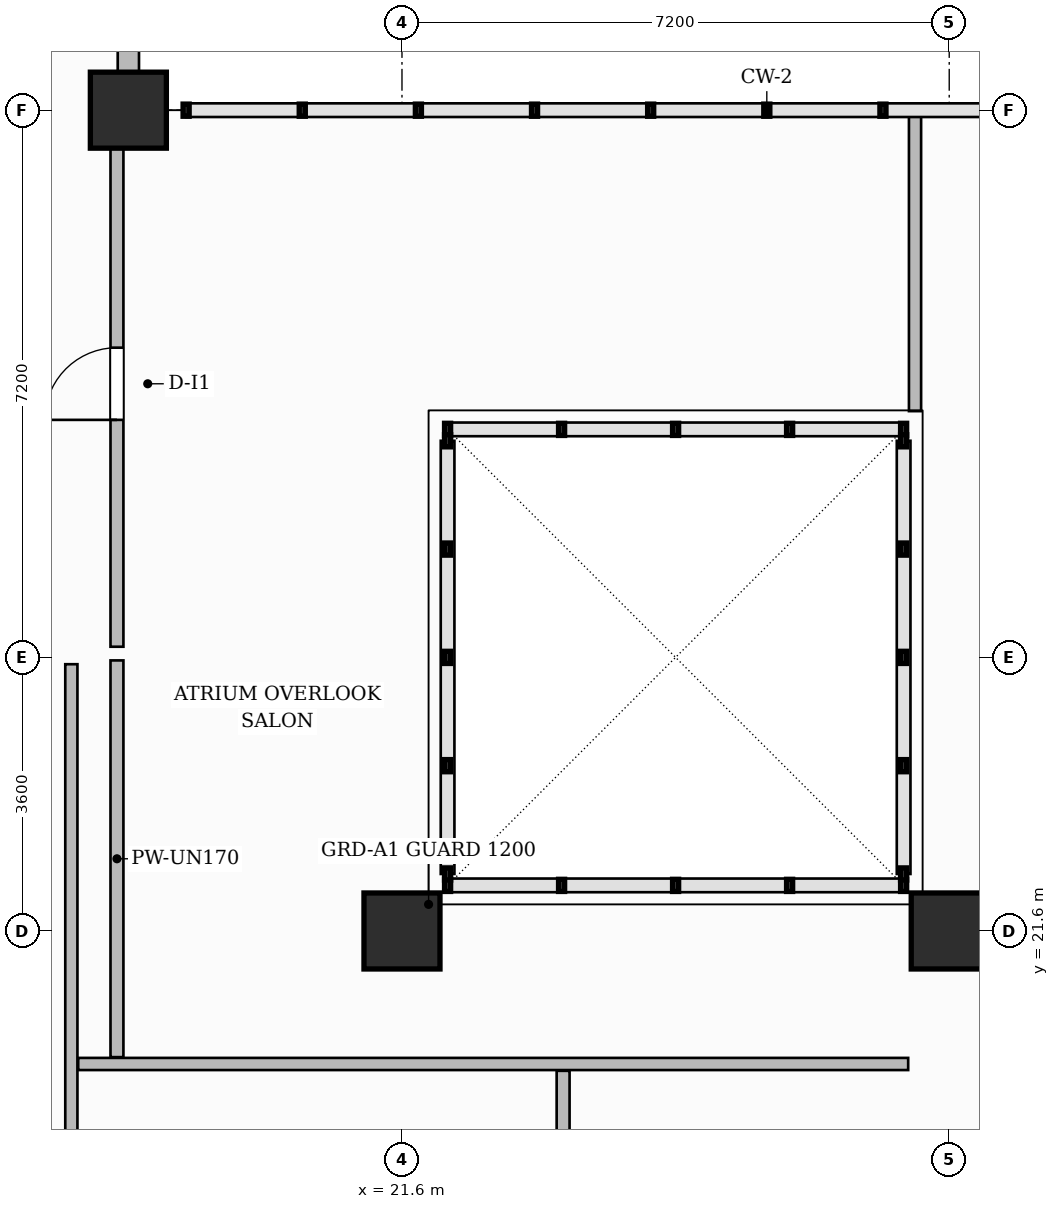
"""IFC4 building model, lengths in metres.
Left out: names, types, materials, properties, quantities, classifications, styles, units other than length and angle.
Written with IfcOpenShell. Run it as: python <this file> out.ifc"""

import sys

from ifc_helpers import new_model, si_unit, direction, frame, frame_2d, origin, origin_2d, place, context, subcontext, project, spatial, rectangle, extrude, source, transform, mapped, element, fill, save


model = new_model("IFC4")
c1 = context("Model", 3, precision=1e-05, world=origin(), true_north=direction((0.0, 1.0)))
c2 = subcontext(c1, "Body", "Model", "MODEL_VIEW")
j1 = project(units=[si_unit("LENGTHUNIT", "METRE"), si_unit("PLANEANGLEUNIT", "RADIAN")], contexts=[c1])
p1 = place(None, origin())
s1 = spatial("IfcSite", under=j1, at=p1, CompositionType="ELEMENT")
p2 = place(p1, origin())
s2 = spatial("IfcBuilding", under=s1, at=p2, CompositionType="ELEMENT")
p3 = place(p2, frame((0.0, 0.0, 111.8)))
s3 = spatial("IfcBuildingStorey", under=s2, at=p3, CompositionType="ELEMENT", Elevation=111.8)
m1 = source(origin(), c2, "Body", "SweptSolid", [
    extrude(rectangle(XDim=1.0, YDim=1.0, at=origin_2d()), origin(), (0.0, 0.0, 1.0), 3.7),
])
for number, where, z_axis, x_axis in (
    (1, (21.6, 21.6, 0.0), (0.0, 0.0, 1.0), (1.0, 0.0, 0.0)),
    (2, (28.8, 21.6, 0.0), (0.0, 0.0, 1.0), (1.0, 0.0, 0.0)),
    (3, (18.0, 32.4, 0.0), (0.0, 0.0, 1.0), (1.0, 0.0, 0.0)),
):
    element("IfcColumn", number, at=place(p3, frame(where, z_axis=z_axis, x_axis=x_axis)), inside=s3, PredefinedType="COLUMN", context=c2, shape_type="MappedRepresentation", body=[
        mapped(m1, transform((0.0, 0.0, 0.0), scale=1.0)),
    ])
p4 = place(p3, frame((17.25, 11.76, 0.0), z_axis=(0.0, 0.0, 1.0), x_axis=(0.0, 1.0, 0.0)))
e4 = element("IfcWall", 4, at=p4, inside=s3, PredefinedType="PARTITIONING", context=c2, shape_type="SweptSolid", body=[
    extrude(rectangle(XDim=13.35, YDim=0.16, at=frame_2d((6.675, 0.0))), origin(), (0.0, 0.0, 1.0), 3.45),
])
p5 = place(p3, frame((17.85, 19.94, 0.0), z_axis=(0.0, 0.0, 1.0), x_axis=(0.0, 1.0, 0.0)))
e5 = element("IfcWall", 5, at=p5, inside=s3, PredefinedType="PARTITIONING", context=c2, shape_type="SweptSolid", body=[
    extrude(rectangle(XDim=5.22, YDim=0.17, at=frame_2d((2.61, 0.0))), origin(), (0.0, 0.0, 1.0), 3.105),
])
p6 = place(p3, frame((17.85, 25.34, 0.0), z_axis=(0.0, 0.0, 1.0), x_axis=(0.0, 1.0, 0.0)))
e6 = element("IfcWall", 6, at=p6, inside=s3, PredefinedType="PARTITIONING", context=c2, shape_type="SweptSolid", body=[
    extrude(rectangle(XDim=6.87, YDim=0.17, at=frame_2d((3.435, 0.0))), origin(), (0.0, 0.0, 1.0), 3.45),
])
p7 = place(p6, frame((2.985, 0.0, 0.0)))
e7 = element("IfcOpeningElement", 7, at=p7, cuts=e6, PredefinedType="OPENING", context=c2, shape_type="SweptSolid", body=[
    extrude(rectangle(XDim=0.95, YDim=2.15, at=frame_2d((0.475, 1.075))), frame((0.0, 0.095, 0.0), z_axis=(0.0, -1.0, 0.0), x_axis=(1.0, 0.0, 0.0)), (0.0, 0.0, 1.0), 0.19),
])
p8 = place(p3, frame((28.35, 28.44, 0.0), z_axis=(0.0, 0.0, 1.0), x_axis=(0.0, 1.0, 0.0)))
e8 = element("IfcWall", 8, at=p8, inside=s3, PredefinedType="PARTITIONING", context=c2, shape_type="SweptSolid", body=[
    extrude(rectangle(XDim=3.932, YDim=0.16, at=frame_2d((1.966, 0.0))), origin(), (0.0, 0.0, 1.0), 3.45),
])
p9 = place(p3, frame((17.34, 19.85, 0.0), z_axis=(0.0, 0.0, 1.0), x_axis=(1.0, 0.0, 0.0)))
e9 = element("IfcWall", 9, at=p9, inside=s3, PredefinedType="PARTITIONING", context=c2, shape_type="SweptSolid", body=[
    extrude(rectangle(XDim=10.92, YDim=0.16, at=frame_2d((5.46, 0.0))), origin(), (0.0, 0.0, 1.0), 3.45),
])
p10 = place(p3, frame((23.72, 11.76, 0.0), z_axis=(0.0, 0.0, 1.0), x_axis=(0.0, 1.0, 0.0)))
e10 = element("IfcWall", 10, at=p10, inside=s3, PredefinedType="PARTITIONING", context=c2, shape_type="SweptSolid", body=[
    extrude(rectangle(XDim=8.0, YDim=0.17, at=frame_2d((4.0, 0.0))), origin(), (0.0, 0.0, 1.0), 3.45),
])
p11 = place(p3, frame((18.0, 32.4, 0.0), z_axis=(0.0, 0.0, 1.0), x_axis=(0.0, 1.0, 0.0)))
e11 = element("IfcWall", 11, at=p11, inside=s3, PredefinedType="SOLIDWALL", context=c2, shape_type="SweptSolid", body=[
    extrude(rectangle(XDim=14.35, YDim=0.28, at=frame_2d((7.175, 0.0))), origin(), (0.0, 0.0, 1.0), 3.45),
])
p12 = place(p11, frame((1.5, 0.0, 0.0)))
e12 = element("IfcOpeningElement", 12, at=p12, cuts=e11, PredefinedType="OPENING", context=c2, shape_type="SweptSolid", body=[
    extrude(rectangle(XDim=1.2, YDim=2.2, at=frame_2d((0.6, 1.1))), frame((0.0, 0.15, 0.0), z_axis=(0.0, -1.0, 0.0), x_axis=(1.0, 0.0, 0.0)), (0.0, 0.0, 1.0), 0.3),
])
p13 = place(p11, frame((3.8, 0.0, 0.8)))
e13 = element("IfcOpeningElement", 13, at=p13, cuts=e11, PredefinedType="OPENING", context=c2, shape_type="SweptSolid", body=[
    extrude(rectangle(XDim=1.8, YDim=1.85, at=frame_2d((0.9, 0.925))), frame((0.0, 0.15, 0.0), z_axis=(0.0, -1.0, 0.0), x_axis=(1.0, 0.0, 0.0)), (0.0, 0.0, 1.0), 0.3),
])
p14 = place(p11, frame((8.525, 0.0, 0.8)))
e14 = element("IfcOpeningElement", 14, at=p14, cuts=e11, PredefinedType="OPENING", context=c2, shape_type="SweptSolid", body=[
    extrude(rectangle(XDim=1.8, YDim=1.85, at=frame_2d((0.9, 0.925))), frame((0.0, 0.15, 0.0), z_axis=(0.0, -1.0, 0.0), x_axis=(1.0, 0.0, 0.0)), (0.0, 0.0, 1.0), 0.3),
])
p15 = place(p11, frame((11.275, 0.0, 0.8)))
e15 = element("IfcOpeningElement", 15, at=p15, cuts=e11, PredefinedType="OPENING", context=c2, shape_type="SweptSolid", body=[
    extrude(rectangle(XDim=1.8, YDim=1.85, at=frame_2d((0.9, 0.925))), frame((0.0, 0.15, 0.0), z_axis=(0.0, -1.0, 0.0), x_axis=(1.0, 0.0, 0.0)), (0.0, 0.0, 1.0), 0.3),
])
m2 = source(origin(), c2, "Body", "SweptSolid", [
    extrude(rectangle(XDim=0.95, YDim=2.15, at=frame_2d((0.475, 1.075))), frame((0.0, 0.025, 0.0), z_axis=(0.0, -1.0, 0.0), x_axis=(1.0, 0.0, 0.0)), (0.0, 0.0, 1.0), 0.05),
])
p16 = place(p7, origin())
e16 = element("IfcDoor", 16, at=p16, inside=s3, OperationType="SINGLE_SWING_LEFT", PredefinedType="DOOR", context=c2, shape_type="MappedRepresentation", body=[
    mapped(m2, transform((0.0, 0.0, 0.0), scale=1.0)),
])
fill(e7, e16)
save(model, sys.argv[1])
